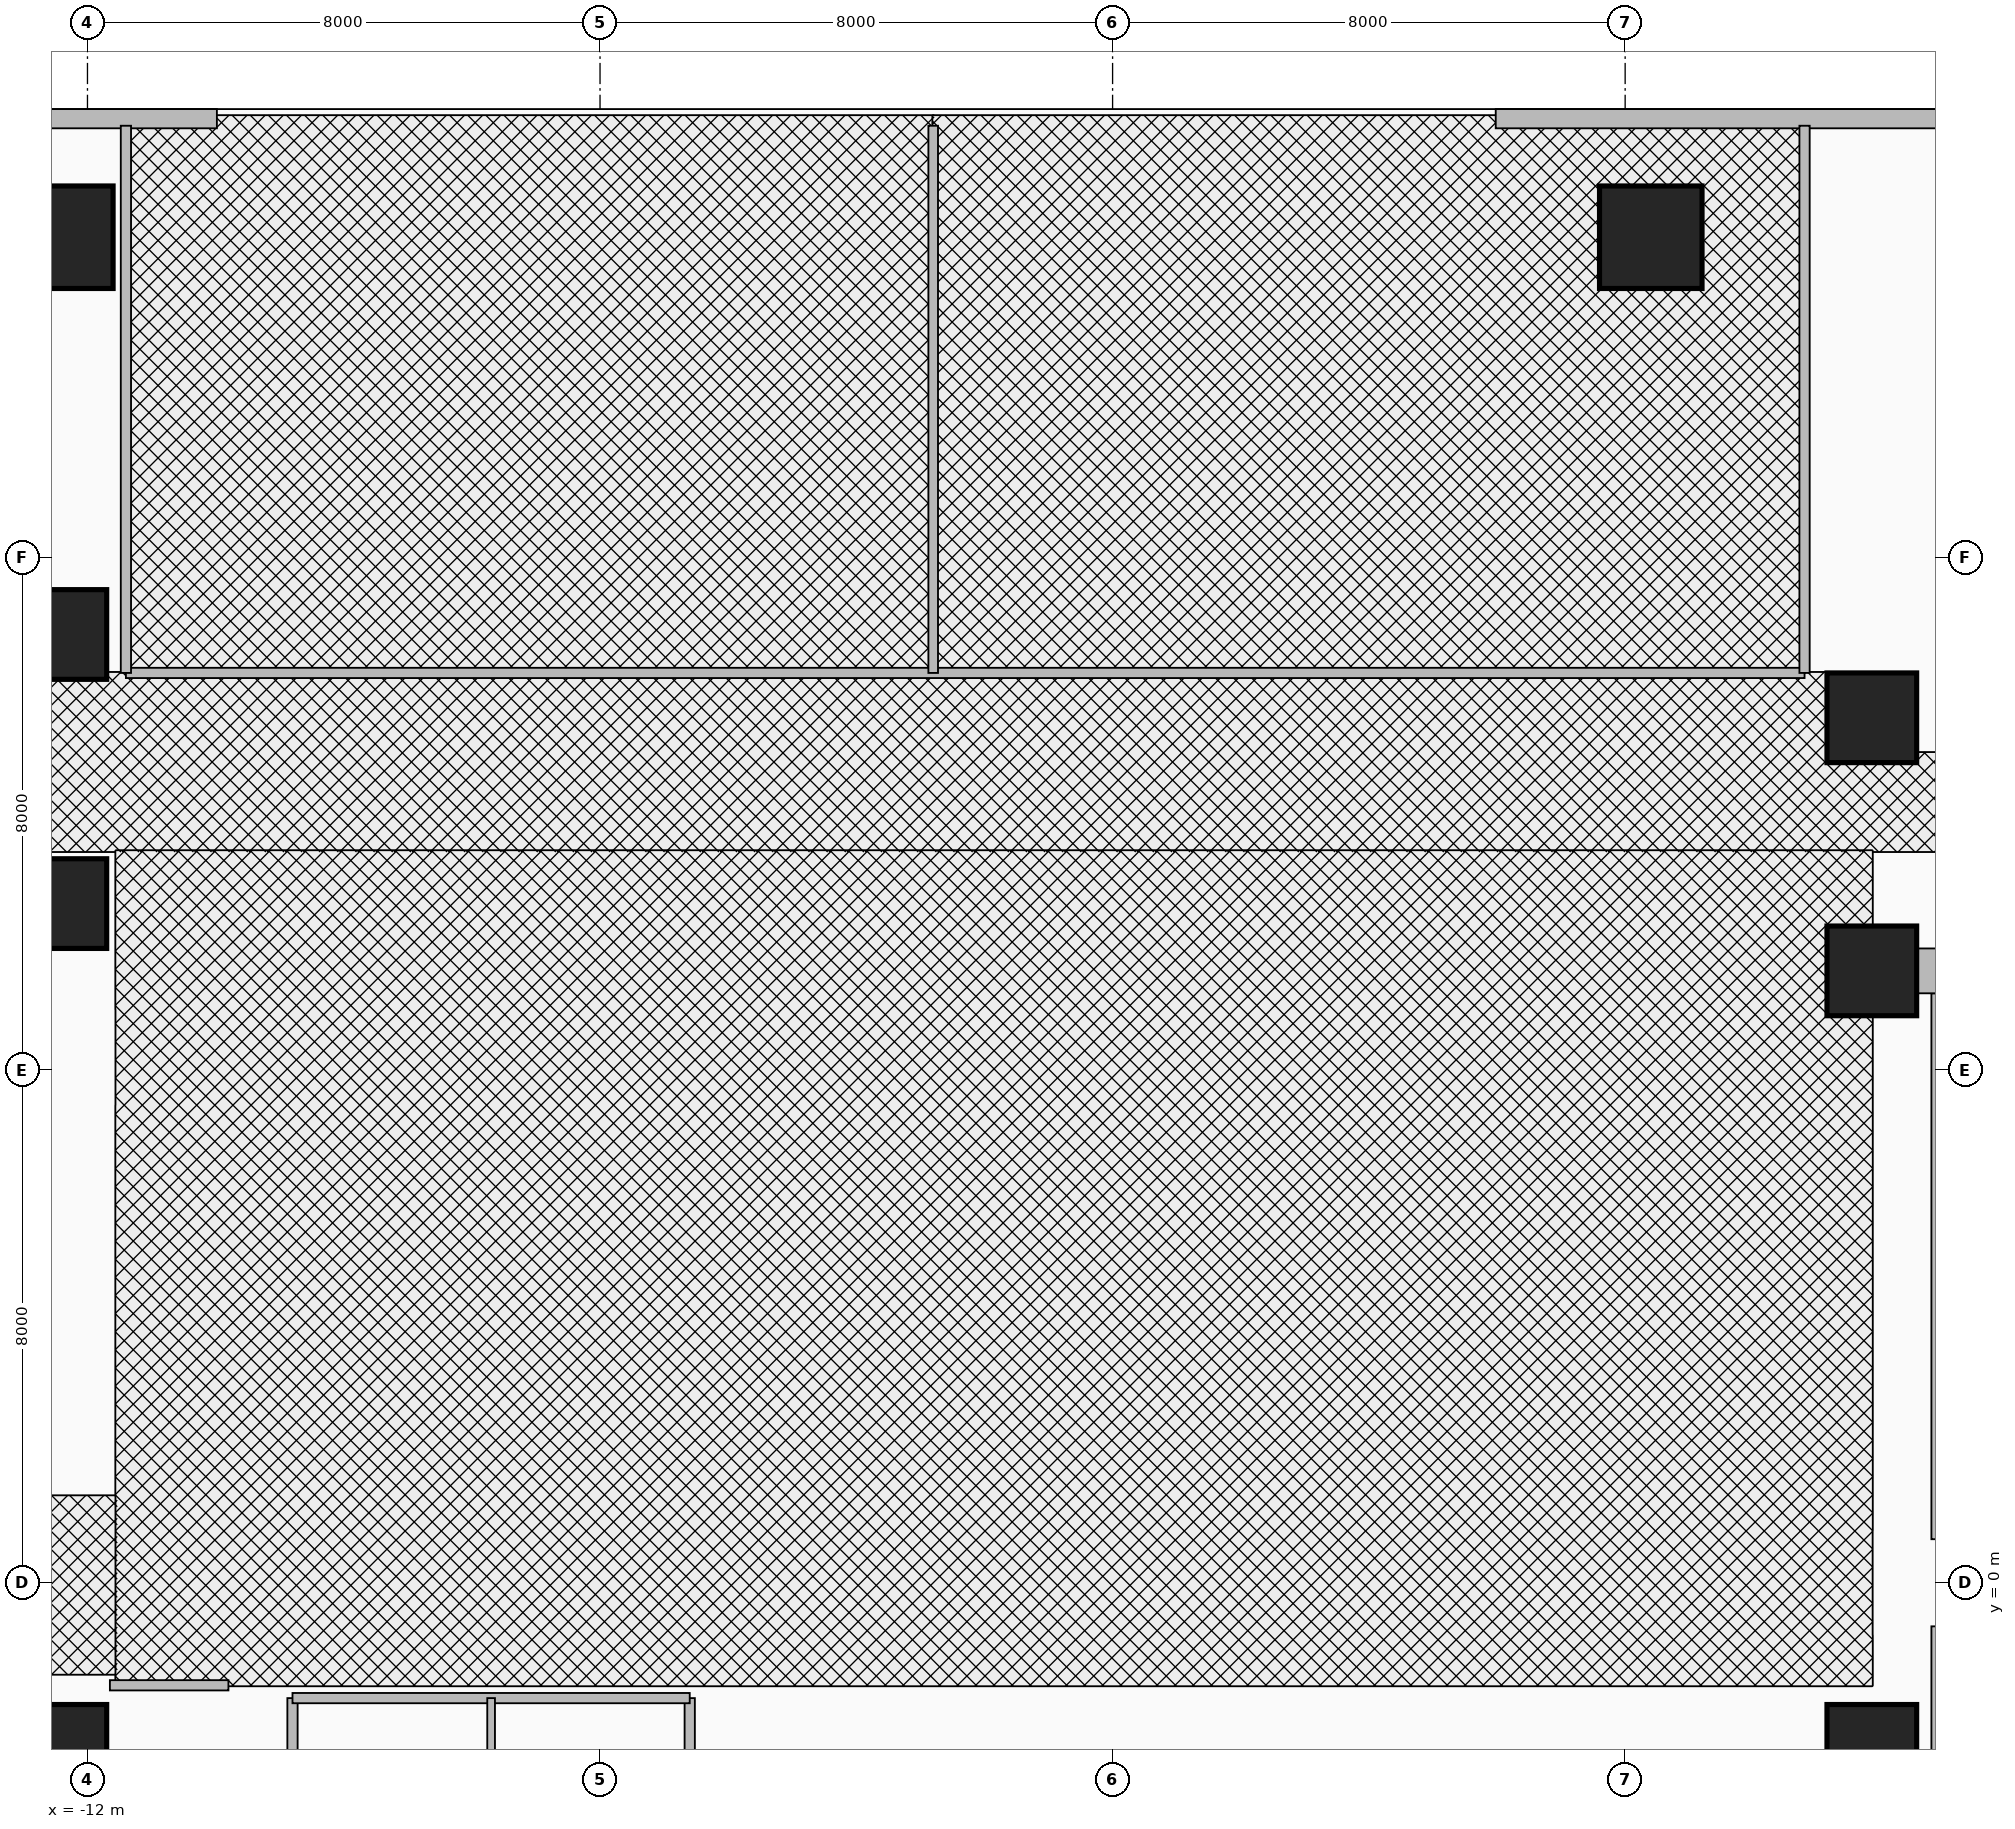
"""IFC4 building model, lengths in metres.
Left out: names, types, materials, properties, quantities, classifications, styles, units other than length and angle.
Written with IfcOpenShell. Run it as: python <this file> out.ifc"""

import sys

from ifc_helpers import new_model, si_unit, direction, frame, frame_2d, origin, origin_2d, place, context, subcontext, project, spatial, rectangle, extrude, source, transform, mapped, element, fill, save


model = new_model("IFC4")
c1 = context("Model", 3, precision=1e-05, world=origin(), true_north=direction((0.0, 1.0)))
c2 = subcontext(c1, "Body", "Model", "MODEL_VIEW")
j1 = project(units=[si_unit("LENGTHUNIT", "METRE"), si_unit("PLANEANGLEUNIT", "RADIAN")], contexts=[c1])
p1 = place(None, origin())
s1 = spatial("IfcSite", under=j1, at=p1, CompositionType="ELEMENT")
p2 = place(p1, origin())
s2 = spatial("IfcBuilding", under=s1, at=p2, CompositionType="ELEMENT")
p3 = place(p2, frame((0.0, 0.0, 10.4)))
s3 = spatial("IfcBuildingStorey", under=s2, at=p3, CompositionType="ELEMENT", Elevation=10.4)
for number, where, z_axis, x_axis in (
    (1, (16.89, 0.68, 0.0), (0.0, 0.0, 1.0), (0.0, 1.0, 0.0)),
    (2, (16.89, -9.2, 0.0), (0.0, 0.0, 1.0), (0.0, 1.0, 0.0)),
):
    element("IfcWall", number, at=place(p3, frame(where, z_axis=z_axis, x_axis=x_axis)), inside=s3, PredefinedType="SHEAR", context=c2, shape_type="SweptSolid", body=[
        extrude(rectangle(XDim=8.52, YDim=0.22, at=frame_2d((4.26, 0.0))), origin(), (0.0, 0.0, 1.0), 4.92),
    ])
p4 = place(p3, frame((-22.65, 10.8, 0.0), z_axis=(0.0, 0.0, 1.0), x_axis=(1.0, 0.0, 0.0)))
e3 = element("IfcWall", 3, at=p4, inside=s3, PredefinedType="SHEAR", context=c2, shape_type="SweptSolid", body=[
    extrude(rectangle(XDim=10.25, YDim=0.7, at=frame_2d((5.125, 0.0))), origin(), (0.0, 0.0, 1.0), 4.92),
])
p5 = place(p3, frame((15.85, 9.55, 0.0), z_axis=(0.0, 0.0, 1.0), x_axis=(1.0, 0.0, 0.0)))
e4 = element("IfcWall", 4, at=p5, inside=s3, PredefinedType="SHEAR", context=c2, shape_type="SweptSolid", body=[
    extrude(rectangle(XDim=9.0, YDim=0.7, at=frame_2d((4.5, 0.0))), origin(), (0.0, 0.0, 1.0), 4.92),
])
m1 = source(origin(), c2, "Body", "SweptSolid", [
    extrude(rectangle(XDim=1.4, YDim=1.4, at=origin_2d()), origin(), (0.0, 0.0, 1.0), 5.2),
])
for number, where, z_axis, x_axis in (
    (5, (-12.4, -2.6, 0.0), (0.0, 0.0, 1.0), (1.0, 0.0, 0.0)),
    (6, (-12.4, 10.6, 0.0), (0.0, 0.0, 1.0), (1.0, 0.0, 0.0)),
    (7, (-12.4, 14.8, 0.0), (0.0, 0.0, 1.0), (1.0, 0.0, 0.0)),
    (8, (15.85, -2.6, 0.0), (0.0, 0.0, 1.0), (1.0, 0.0, 0.0)),
    (9, (15.85, 9.55, 0.0), (0.0, 0.0, 1.0), (1.0, 0.0, 0.0)),
    (10, (15.85, 13.5, 0.0), (0.0, 0.0, 1.0), (1.0, 0.0, 0.0)),
):
    element("IfcColumn", number, at=place(p3, frame(where, z_axis=z_axis, x_axis=x_axis)), inside=s3, PredefinedType="COLUMN", context=c2, shape_type="MappedRepresentation", body=[
        mapped(m1, transform((0.0, 0.0, 0.0), x_axis=(1.0, 0.0, 0.0), y_axis=(0.0, 1.0, 0.0), z_axis=(0.0, 0.0, 1.0), scale=1.0)),
    ])
m2 = source(origin(), c2, "Body", "SweptSolid", [
    extrude(rectangle(XDim=1.6, YDim=1.6, at=origin_2d()), origin(), (0.0, 0.0, 1.0), 5.2),
])
for number, where, z_axis, x_axis in (
    (11, (-12.4, 21.0, 0.0), (0.0, 0.0, 1.0), (1.0, 0.0, 0.0)),
    (12, (12.4, 21.0, 0.0), (0.0, 0.0, 1.0), (1.0, 0.0, 0.0)),
):
    element("IfcColumn", number, at=place(p3, frame(where, z_axis=z_axis, x_axis=x_axis)), inside=s3, PredefinedType="COLUMN", context=c2, shape_type="MappedRepresentation", body=[
        mapped(m2, transform((0.0, 0.0, 0.0), x_axis=(1.0, 0.0, 0.0), y_axis=(0.0, 1.0, 0.0), z_axis=(0.0, 0.0, 1.0), scale=1.0)),
    ])
p6 = place(p3, frame((-33.85, 22.85, 0.0), z_axis=(0.0, 0.0, 1.0), x_axis=(1.0, 0.0, 0.0)))
e13 = element("IfcWall", 13, at=p6, inside=s3, PredefinedType="SOLIDWALL", context=c2, shape_type="SweptSolid", body=[
    extrude(rectangle(XDim=23.87, YDim=0.3, at=frame_2d((11.935, 0.0))), origin(), (0.0, 0.0, 1.0), 4.92),
])
p7 = place(p6, frame((3.2, 0.0, 0.9)))
e14 = element("IfcOpeningElement", 14, at=p7, cuts=e13, PredefinedType="OPENING", context=c2, shape_type="SweptSolid", body=[
    extrude(rectangle(XDim=1.5, YDim=1.75, at=frame_2d((0.75, 0.875))), frame((0.0, 0.165, 0.0), z_axis=(0.0, -1.0, 0.0), x_axis=(1.0, 0.0, 0.0)), (0.0, 0.0, 1.0), 0.33),
])
p8 = place(p6, frame((10.0, 0.0, 0.9)))
e15 = element("IfcOpeningElement", 15, at=p8, cuts=e13, PredefinedType="OPENING", context=c2, shape_type="SweptSolid", body=[
    extrude(rectangle(XDim=1.5, YDim=1.75, at=frame_2d((0.75, 0.875))), frame((0.0, 0.165, 0.0), z_axis=(0.0, -1.0, 0.0), x_axis=(1.0, 0.0, 0.0)), (0.0, 0.0, 1.0), 0.33),
])
p9 = place(p6, frame((17.8, 0.0, 0.9)))
e16 = element("IfcOpeningElement", 16, at=p9, cuts=e13, PredefinedType="OPENING", context=c2, shape_type="SweptSolid", body=[
    extrude(rectangle(XDim=1.5, YDim=1.75, at=frame_2d((0.75, 0.875))), frame((0.0, 0.165, 0.0), z_axis=(0.0, -1.0, 0.0), x_axis=(1.0, 0.0, 0.0)), (0.0, 0.0, 1.0), 0.33),
])
p10 = place(p3, frame((9.98, 22.85, 0.0), z_axis=(0.0, 0.0, 1.0), x_axis=(1.0, 0.0, 0.0)))
e17 = element("IfcWall", 17, at=p10, inside=s3, PredefinedType="SOLIDWALL", context=c2, shape_type="SweptSolid", body=[
    extrude(rectangle(XDim=23.87, YDim=0.3, at=frame_2d((11.935, 0.0))), origin(), (0.0, 0.0, 1.0), 4.92),
])
p11 = place(p10, frame((3.2, 0.0, 0.9)))
e18 = element("IfcOpeningElement", 18, at=p11, cuts=e17, PredefinedType="OPENING", context=c2, shape_type="SweptSolid", body=[
    extrude(rectangle(XDim=1.5, YDim=1.75, at=frame_2d((0.75, 0.875))), frame((0.0, 0.165, 0.0), z_axis=(0.0, -1.0, 0.0), x_axis=(1.0, 0.0, 0.0)), (0.0, 0.0, 1.0), 0.33),
])
p12 = place(p10, frame((10.0, 0.0, 0.9)))
e19 = element("IfcOpeningElement", 19, at=p12, cuts=e17, PredefinedType="OPENING", context=c2, shape_type="SweptSolid", body=[
    extrude(rectangle(XDim=1.5, YDim=1.75, at=frame_2d((0.75, 0.875))), frame((0.0, 0.165, 0.0), z_axis=(0.0, -1.0, 0.0), x_axis=(1.0, 0.0, 0.0)), (0.0, 0.0, 1.0), 0.33),
])
p13 = place(p10, frame((17.8, 0.0, 0.9)))
e20 = element("IfcOpeningElement", 20, at=p13, cuts=e17, PredefinedType="OPENING", context=c2, shape_type="SweptSolid", body=[
    extrude(rectangle(XDim=1.5, YDim=1.75, at=frame_2d((0.75, 0.875))), frame((0.0, 0.165, 0.0), z_axis=(0.0, -1.0, 0.0), x_axis=(1.0, 0.0, 0.0)), (0.0, 0.0, 1.0), 0.33),
])
p14 = place(p3, frame((-11.4, 14.2, 0.0), z_axis=(0.0, 0.0, 1.0), x_axis=(1.0, 0.0, 0.0)))
e21 = element("IfcWall", 21, at=p14, inside=s3, PredefinedType="PARTITIONING", context=c2, shape_type="SweptSolid", body=[
    extrude(rectangle(XDim=26.2, YDim=0.16, at=frame_2d((13.1, 0.0))), origin(), (0.0, 0.0, 1.0), 4.92),
])
p15 = place(p14, frame((4.5, 0.0, 0.0)))
e22 = element("IfcOpeningElement", 22, at=p15, cuts=e21, PredefinedType="OPENING", context=c2, shape_type="SweptSolid", body=[
    extrude(rectangle(XDim=1.8, YDim=2.15, at=frame_2d((0.9, 1.075))), frame((0.0, 0.095, 0.0), z_axis=(0.0, -1.0, 0.0), x_axis=(1.0, 0.0, 0.0)), (0.0, 0.0, 1.0), 0.19),
])
p16 = place(p14, frame((17.5, 0.0, 0.0)))
e23 = element("IfcOpeningElement", 23, at=p16, cuts=e21, PredefinedType="OPENING", context=c2, shape_type="SweptSolid", body=[
    extrude(rectangle(XDim=1.8, YDim=2.15, at=frame_2d((0.9, 1.075))), frame((0.0, 0.095, 0.0), z_axis=(0.0, -1.0, 0.0), x_axis=(1.0, 0.0, 0.0)), (0.0, 0.0, 1.0), 0.19),
])
for number, where, z_axis, x_axis in (
    (24, (-11.4, 14.2, 0.0), (0.0, 0.0, 1.0), (0.0, 1.0, 0.0)),
    (25, (14.8, 14.2, 0.0), (0.0, 0.0, 1.0), (0.0, 1.0, 0.0)),
):
    element("IfcWall", number, at=place(p3, frame(where, z_axis=z_axis, x_axis=x_axis)), inside=s3, PredefinedType="PARTITIONING", context=c2, shape_type="SweptSolid", body=[
        extrude(rectangle(XDim=8.54, YDim=0.16, at=frame_2d((4.27, 0.0))), origin(), (0.0, 0.0, 1.0), 3.957),
    ])
p17 = place(p3, frame((1.2, 14.2, 0.0), z_axis=(0.0, 0.0, 1.0), x_axis=(0.0, 1.0, 0.0)))
e26 = element("IfcWall", 26, at=p17, inside=s3, PredefinedType="PARTITIONING", context=c2, shape_type="SweptSolid", body=[
    extrude(rectangle(XDim=8.54, YDim=0.15, at=frame_2d((4.27, 0.0))), origin(), (0.0, 0.0, 1.0), 3.957),
])
for number, where, z_axis, x_axis in (
    (27, (-8.8, -5.2, 0.0), (0.0, 0.0, 1.0), (0.0, 1.0, 0.0)),
    (28, (-2.6, -5.2, 0.0), (0.0, 0.0, 1.0), (0.0, 1.0, 0.0)),
):
    element("IfcWall", number, at=place(p3, frame(where, z_axis=z_axis, x_axis=x_axis)), inside=s3, PredefinedType="PARTITIONING", context=c2, shape_type="SweptSolid", body=[
        extrude(rectangle(XDim=3.4, YDim=0.16, at=frame_2d((1.7, 0.0))), origin(), (0.0, 0.0, 1.0), 4.92),
    ])
p18 = place(p3, frame((-8.8, -1.8, 0.0), z_axis=(0.0, 0.0, 1.0), x_axis=(1.0, 0.0, 0.0)))
e29 = element("IfcWall", 29, at=p18, inside=s3, PredefinedType="PARTITIONING", context=c2, shape_type="SweptSolid", body=[
    extrude(rectangle(XDim=6.2, YDim=0.16, at=frame_2d((3.1, 0.0))), origin(), (0.0, 0.0, 1.0), 4.92),
])
p19 = place(p18, frame((0.3, 0.0, 0.0)))
e30 = element("IfcOpeningElement", 30, at=p19, cuts=e29, PredefinedType="OPENING", context=c2, shape_type="SweptSolid", body=[
    extrude(rectangle(XDim=0.85, YDim=2.1, at=frame_2d((0.425, 1.05))), frame((0.0, 0.095, 0.0), z_axis=(0.0, -1.0, 0.0), x_axis=(1.0, 0.0, 0.0)), (0.0, 0.0, 1.0), 0.19),
])
p20 = place(p18, frame((3.35, 0.0, 0.0)))
e31 = element("IfcOpeningElement", 31, at=p20, cuts=e29, PredefinedType="OPENING", context=c2, shape_type="SweptSolid", body=[
    extrude(rectangle(XDim=0.85, YDim=2.1, at=frame_2d((0.425, 1.05))), frame((0.0, 0.095, 0.0), z_axis=(0.0, -1.0, 0.0), x_axis=(1.0, 0.0, 0.0)), (0.0, 0.0, 1.0), 0.19),
])
p21 = place(p3, frame((-5.7, -5.2, 0.0), z_axis=(0.0, 0.0, 1.0), x_axis=(0.0, 1.0, 0.0)))
e32 = element("IfcWall", 32, at=p21, inside=s3, PredefinedType="PARTITIONING", context=c2, shape_type="SweptSolid", body=[
    extrude(rectangle(XDim=3.4, YDim=0.12, at=frame_2d((1.7, 0.0))), origin(), (0.0, 0.0, 1.0), 4.92),
])
p22 = place(p3, frame((-11.65, -1.6, 0.0), z_axis=(0.0, 0.0, 1.0), x_axis=(1.0, 0.0, 0.0)))
e33 = element("IfcWall", 33, at=p22, inside=s3, PredefinedType="PARTITIONING", context=c2, shape_type="SweptSolid", body=[
    extrude(rectangle(XDim=1.85, YDim=0.16, at=frame_2d((0.925, 0.0))), origin(), (0.0, 0.0, 1.0), 4.92),
])
p23 = place(p11, origin())
e34 = element("IfcWindow", 34, at=p23, inside=s3, PartitioningType="SINGLE_PANEL", PredefinedType="WINDOW", context=c2, shape_type="SweptSolid", body=[
    extrude(rectangle(XDim=1.5, YDim=1.75, at=frame_2d((0.75, 0.875))), frame((0.0, 0.03, 0.0), z_axis=(0.0, -1.0, 0.0), x_axis=(1.0, 0.0, 0.0)), (0.0, 0.0, 1.0), 0.06),
])
fill(e18, e34)
p24 = place(p15, origin())
e35 = element("IfcDoor", 35, at=p24, inside=s3, OperationType="DOUBLE_DOOR_SINGLE_SWING", PredefinedType="DOOR", context=c2, shape_type="SweptSolid", body=[
    extrude(rectangle(XDim=1.8, YDim=2.15, at=frame_2d((0.9, 1.075))), frame((0.0, 0.025, 0.0), z_axis=(0.0, -1.0, 0.0), x_axis=(1.0, 0.0, 0.0)), (0.0, 0.0, 1.0), 0.05),
])
fill(e22, e35)
p25 = place(p16, frame((1.8, 0.0, 0.0), z_axis=(0.0, 0.0, 1.0), x_axis=(-1.0, 0.0, 0.0)))
e36 = element("IfcDoor", 36, at=p25, inside=s3, OperationType="DOUBLE_DOOR_SINGLE_SWING", PredefinedType="DOOR", context=c2, shape_type="SweptSolid", body=[
    extrude(rectangle(XDim=1.8, YDim=2.15, at=frame_2d((0.9, 1.075))), frame((0.0, 0.025, 0.0), z_axis=(0.0, -1.0, 0.0), x_axis=(1.0, 0.0, 0.0)), (0.0, 0.0, 1.0), 0.05),
])
fill(e23, e36)
p26 = place(p19, origin())
e37 = element("IfcDoor", 37, at=p26, inside=s3, OperationType="SINGLE_SWING_RIGHT", PredefinedType="DOOR", context=c2, shape_type="SweptSolid", body=[
    extrude(rectangle(XDim=0.85, YDim=2.1, at=frame_2d((0.425, 1.05))), frame((0.0, 0.025, 0.0), z_axis=(0.0, -1.0, 0.0), x_axis=(1.0, 0.0, 0.0)), (0.0, 0.0, 1.0), 0.05),
])
fill(e30, e37)
p27 = place(p20, origin())
e38 = element("IfcDoor", 38, at=p27, inside=s3, OperationType="SINGLE_SWING_LEFT", PredefinedType="DOOR", context=c2, shape_type="SweptSolid", body=[
    extrude(rectangle(XDim=0.85, YDim=2.1, at=frame_2d((0.425, 1.05))), frame((0.0, 0.025, 0.0), z_axis=(0.0, -1.0, 0.0), x_axis=(1.0, 0.0, 0.0)), (0.0, 0.0, 1.0), 0.05),
])
fill(e31, e38)
save(model, sys.argv[1])
